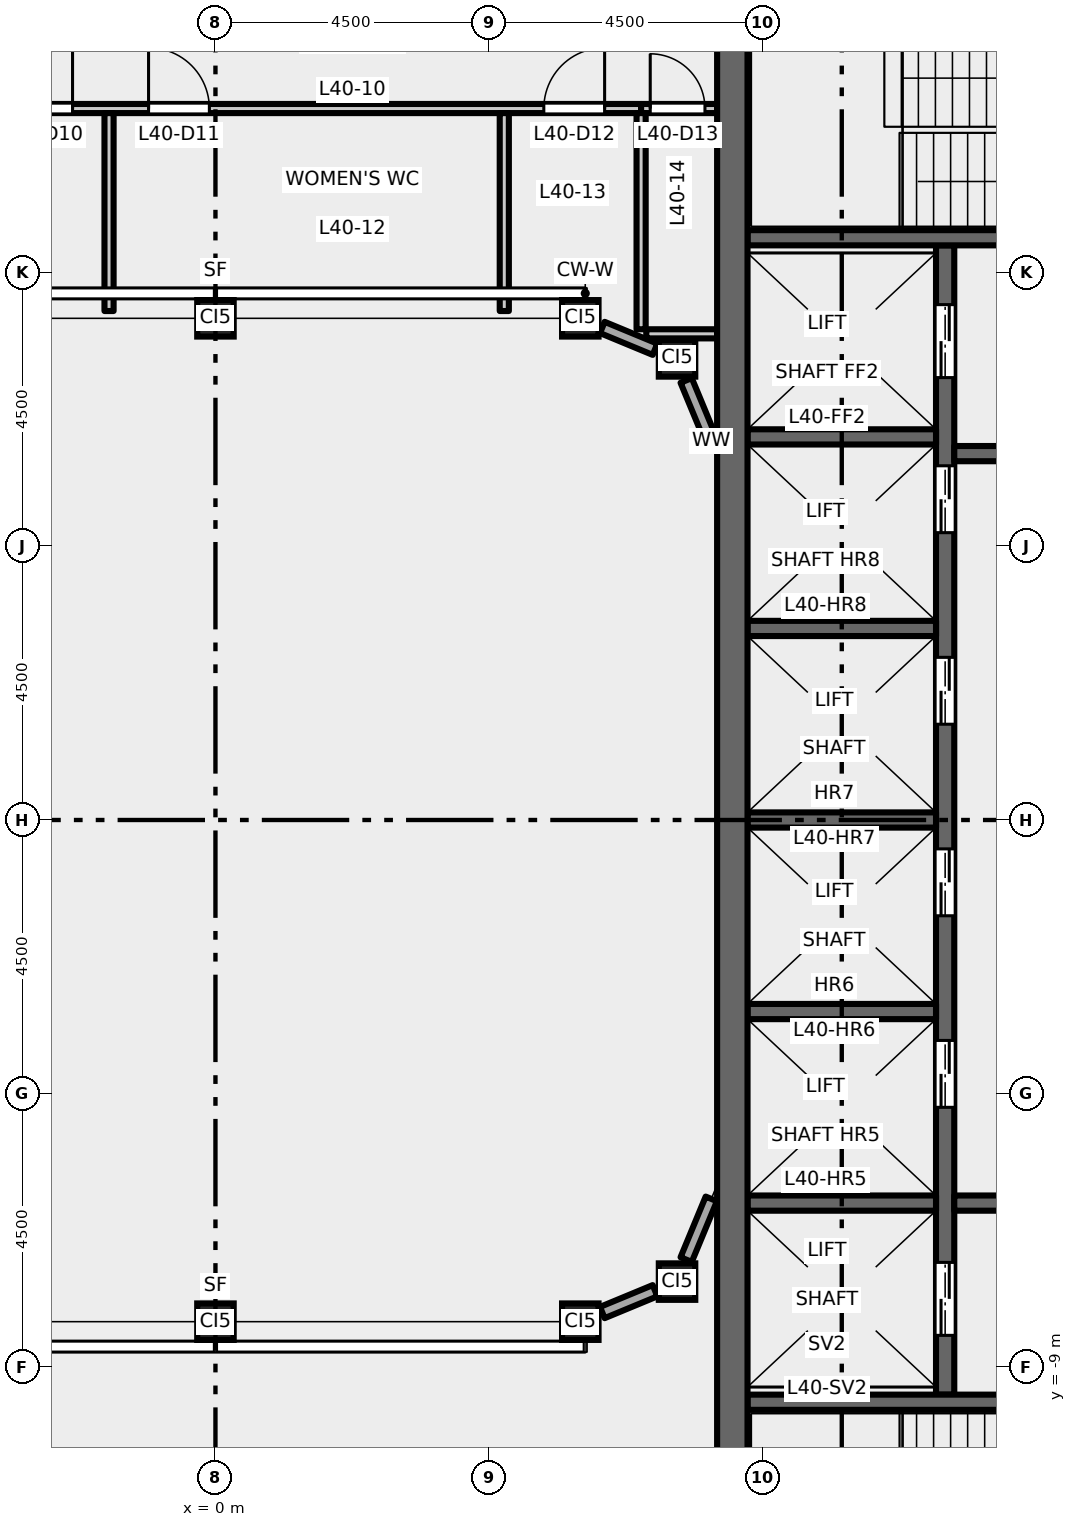
"""IFC4 building model, lengths in metres.
Left out: names, types, materials, properties, quantities, classifications, styles, units other than length and angle.
Written with IfcOpenShell. Run it as: python <this file> out.ifc"""

import sys

from ifc_helpers import new_model, si_unit, direction, frame, frame_2d, origin, origin_2d, place, context, subcontext, project, spatial, rectangle, hollow_rectangle, extrude, element, fill, save


model = new_model("IFC4")
c1 = context("Model", 3, precision=1e-05, world=origin(), true_north=direction((0.0, 1.0)))
c2 = subcontext(c1, "Body", "Model", "MODEL_VIEW")
j1 = project(units=[si_unit("LENGTHUNIT", "METRE"), si_unit("PLANEANGLEUNIT", "RADIAN")], contexts=[c1])
p1 = place(None, origin())
s1 = spatial("IfcSite", under=j1, at=p1, CompositionType="ELEMENT")
p2 = place(p1, origin())
s2 = spatial("IfcBuilding", under=s1, at=p2, CompositionType="ELEMENT")
p3 = place(p2, frame((0.0, 0.0, 187.2)))
s3 = spatial("IfcBuildingStorey", under=s2, at=p3, CompositionType="ELEMENT", Elevation=187.2)
for number, where, z_axis, x_axis in (
    (1, (0.0, -8.25, 0.0), (0.0, 0.0, 1.0), (1.0, 0.0, 0.0)),
    (2, (6.0, -8.25, 0.0), (0.0, 0.0, 1.0), (1.0, 0.0, 0.0)),
    (3, (7.591, -7.591, 0.0), (0.0, 0.0, 1.0), (1.0, 0.0, 0.0)),
    (4, (0.0, 8.25, 0.0), (0.0, 0.0, 1.0), (1.0, 0.0, 0.0)),
    (5, (6.0, 8.25, 0.0), (0.0, 0.0, 1.0), (1.0, 0.0, 0.0)),
    (6, (7.591, 7.591, 0.0), (0.0, 0.0, 1.0), (1.0, 0.0, 0.0)),
):
    element("IfcColumn", number, at=place(p3, frame(where, z_axis=z_axis, x_axis=x_axis)), inside=s3, PredefinedType="COLUMN", context=c2, shape_type="SweptSolid", body=[
        extrude(hollow_rectangle(XDim=0.6, YDim=0.6, WallThickness=0.032, at=origin_2d()), origin(), (0.0, 0.0, 1.0), 5.5),
    ])
p4 = place(p3, frame((12.0, -9.45, 0.0), z_axis=(0.0, 0.0, 1.0), x_axis=(0.0, 1.0, 0.0)))
e7 = element("IfcWall", 7, at=p4, inside=s3, PredefinedType="SHEAR", context=c2, shape_type="SweptSolid", body=[
    extrude(rectangle(XDim=18.9, YDim=0.3, at=frame_2d((9.45, 0.0))), origin(), (0.0, 0.0, 1.0), 5.35),
])
p5 = place(p4, frame((4.725, 0.0, 0.0)))
e8 = element("IfcOpeningElement", 8, at=p5, cuts=e7, PredefinedType="OPENING", context=c2, shape_type="SweptSolid", body=[
    extrude(rectangle(XDim=1.1, YDim=2.1, at=frame_2d((0.55, 1.05))), frame((0.0, 0.16, 0.0), z_axis=(0.0, -1.0, 0.0), x_axis=(1.0, 0.0, 0.0)), (0.0, 0.0, 1.0), 0.32),
])
p6 = place(p4, frame((7.875, 0.0, 0.0)))
e9 = element("IfcOpeningElement", 9, at=p6, cuts=e7, PredefinedType="OPENING", context=c2, shape_type="SweptSolid", body=[
    extrude(rectangle(XDim=1.1, YDim=2.1, at=frame_2d((0.55, 1.05))), frame((0.0, 0.16, 0.0), z_axis=(0.0, -1.0, 0.0), x_axis=(1.0, 0.0, 0.0)), (0.0, 0.0, 1.0), 0.32),
])
p7 = place(p4, frame((11.025, 0.0, 0.0)))
e10 = element("IfcOpeningElement", 10, at=p7, cuts=e7, PredefinedType="OPENING", context=c2, shape_type="SweptSolid", body=[
    extrude(rectangle(XDim=1.1, YDim=2.1, at=frame_2d((0.55, 1.05))), frame((0.0, 0.16, 0.0), z_axis=(0.0, -1.0, 0.0), x_axis=(1.0, 0.0, 0.0)), (0.0, 0.0, 1.0), 0.32),
])
p8 = place(p4, frame((14.175, 0.0, 0.0)))
e11 = element("IfcOpeningElement", 11, at=p8, cuts=e7, PredefinedType="OPENING", context=c2, shape_type="SweptSolid", body=[
    extrude(rectangle(XDim=1.1, YDim=2.1, at=frame_2d((0.55, 1.05))), frame((0.0, 0.16, 0.0), z_axis=(0.0, -1.0, 0.0), x_axis=(1.0, 0.0, 0.0)), (0.0, 0.0, 1.0), 0.32),
])
p9 = place(p4, frame((16.725, 0.0, 0.0)))
e12 = element("IfcOpeningElement", 12, at=p9, cuts=e7, PredefinedType="OPENING", context=c2, shape_type="SweptSolid", body=[
    extrude(rectangle(XDim=1.2, YDim=2.1, at=frame_2d((0.6, 1.05))), frame((0.0, 0.16, 0.0), z_axis=(0.0, -1.0, 0.0), x_axis=(1.0, 0.0, 0.0)), (0.0, 0.0, 1.0), 0.32),
])
p10 = place(p4, frame((0.975, 0.0, 0.0)))
e13 = element("IfcOpeningElement", 13, at=p10, cuts=e7, PredefinedType="OPENING", context=c2, shape_type="SweptSolid", body=[
    extrude(rectangle(XDim=1.2, YDim=2.1, at=frame_2d((0.6, 1.05))), frame((0.0, 0.16, 0.0), z_axis=(0.0, -1.0, 0.0), x_axis=(1.0, 0.0, 0.0)), (0.0, 0.0, 1.0), 0.32),
])
p11 = place(p3, frame((12.15, 6.025, 0.0), z_axis=(0.0, 0.0, 1.0), x_axis=(1.0, 0.0, 0.0)))
e14 = element("IfcWall", 14, at=p11, inside=s3, PredefinedType="SHEAR", context=c2, shape_type="SweptSolid", body=[
    extrude(rectangle(XDim=4.6, YDim=0.25, at=frame_2d((2.3, 0.0))), origin(), (0.0, 0.0, 1.0), 5.35),
])
p12 = place(p11, frame((1.8, 0.0, 0.0)))
e15 = element("IfcOpeningElement", 15, at=p12, cuts=e14, PredefinedType="OPENING", context=c2, shape_type="SweptSolid", body=[
    extrude(rectangle(XDim=1.0, YDim=2.1, at=frame_2d((0.5, 1.05))), frame((0.0, 0.135, 0.0), z_axis=(0.0, -1.0, 0.0), x_axis=(1.0, 0.0, 0.0)), (0.0, 0.0, 1.0), 0.27),
])
p13 = place(p3, frame((12.15, -6.3, 0.0), z_axis=(0.0, 0.0, 1.0), x_axis=(1.0, 0.0, 0.0)))
e16 = element("IfcWall", 16, at=p13, inside=s3, PredefinedType="SHEAR", context=c2, shape_type="SweptSolid", body=[
    extrude(rectangle(XDim=9.1, YDim=0.25, at=frame_2d((4.55, 0.0))), origin(), (0.0, 0.0, 1.0), 5.35),
])
p14 = place(p13, frame((1.8, 0.0, 0.0)))
e17 = element("IfcOpeningElement", 17, at=p14, cuts=e16, PredefinedType="OPENING", context=c2, shape_type="SweptSolid", body=[
    extrude(rectangle(XDim=1.0, YDim=2.1, at=frame_2d((0.5, 1.05))), frame((0.0, 0.135, 0.0), z_axis=(0.0, -1.0, 0.0), x_axis=(1.0, 0.0, 0.0)), (0.0, 0.0, 1.0), 0.27),
])
p15 = place(p13, frame((7.65, 0.0, 0.0)))
e18 = element("IfcOpeningElement", 18, at=p15, cuts=e16, PredefinedType="OPENING", context=c2, shape_type="SweptSolid", body=[
    extrude(rectangle(XDim=0.9, YDim=2.1, at=frame_2d((0.45, 1.05))), frame((0.0, 0.135, 0.0), z_axis=(0.0, -1.0, 0.0), x_axis=(1.0, 0.0, 0.0)), (0.0, 0.0, 1.0), 0.27),
])
for number, where, z_axis, x_axis in (
    (19, (8.75, 0.0, 0.0), (0.0, 0.0, 1.0), (1.0, 0.0, 0.0)),
    (20, (8.75, 3.15, 0.0), (0.0, 0.0, 1.0), (1.0, 0.0, 0.0)),
    (21, (8.75, 6.3, 0.0), (0.0, 0.0, 1.0), (1.0, 0.0, 0.0)),
    (22, (8.75, -3.15, 0.0), (0.0, 0.0, 1.0), (1.0, 0.0, 0.0)),
    (23, (8.75, -6.3, 0.0), (0.0, 0.0, 1.0), (1.0, 0.0, 0.0)),
):
    element("IfcWall", number, at=place(p3, frame(where, z_axis=z_axis, x_axis=x_axis)), inside=s3, PredefinedType="SHEAR", context=c2, shape_type="SweptSolid", body=[
        extrude(rectangle(XDim=3.1, YDim=0.25, at=frame_2d((1.55, 0.0))), origin(), (0.0, 0.0, 1.0), 5.35),
    ])
p16 = place(p3, frame((8.75, 9.575, 0.0), z_axis=(0.0, 0.0, 1.0), x_axis=(1.0, 0.0, 0.0)))
e24 = element("IfcWall", 24, at=p16, inside=s3, PredefinedType="SHEAR", context=c2, shape_type="SweptSolid", body=[
    extrude(rectangle(XDim=8.0, YDim=0.25, at=frame_2d((4.0, 0.0))), origin(), (0.0, 0.0, 1.0), 5.35),
])
p17 = place(p16, frame((6.65, 0.0, 0.0)))
e25 = element("IfcOpeningElement", 25, at=p17, cuts=e24, PredefinedType="OPENING", context=c2, shape_type="SweptSolid", body=[
    extrude(rectangle(XDim=1.1, YDim=2.1, at=frame_2d((0.55, 1.05))), frame((0.0, 0.135, 0.0), z_axis=(0.0, -1.0, 0.0), x_axis=(1.0, 0.0, 0.0)), (0.0, 0.0, 1.0), 0.27),
])
p18 = place(p3, frame((8.75, -9.575, 0.0), z_axis=(0.0, 0.0, 1.0), x_axis=(1.0, 0.0, 0.0)))
e26 = element("IfcWall", 26, at=p18, inside=s3, PredefinedType="SHEAR", context=c2, shape_type="SweptSolid", body=[
    extrude(rectangle(XDim=8.0, YDim=0.25, at=frame_2d((4.0, 0.0))), origin(), (0.0, 0.0, 1.0), 5.35),
])
p19 = place(p18, frame((6.65, 0.0, 0.0)))
e27 = element("IfcOpeningElement", 27, at=p19, cuts=e26, PredefinedType="OPENING", context=c2, shape_type="SweptSolid", body=[
    extrude(rectangle(XDim=1.1, YDim=2.1, at=frame_2d((0.55, 1.05))), frame((0.0, 0.135, 0.0), z_axis=(0.0, -1.0, 0.0), x_axis=(1.0, 0.0, 0.0)), (0.0, 0.0, 1.0), 0.27),
])
p20 = place(p3, frame((8.5, -13.0, 0.0), z_axis=(0.0, 0.0, 1.0), x_axis=(0.0, 1.0, 0.0)))
e28 = element("IfcWall", 28, at=p20, inside=s3, PredefinedType="SHEAR", context=c2, shape_type="SweptSolid", body=[
    extrude(rectangle(XDim=26.0, YDim=0.5, at=frame_2d((13.0, 0.0))), origin(), (0.0, 0.0, 1.0), 5.35),
])
p21 = place(p3, frame((6.362, -8.1, 0.0), z_axis=(0.0, 0.0, 1.0), x_axis=(0.923829670615, 0.382803787458, 0.0)))
e29 = element("IfcWall", 29, at=p21, inside=s3, PredefinedType="STANDARD", context=c2, shape_type="SweptSolid", body=[
    extrude(rectangle(XDim=0.938, YDim=0.2, at=frame_2d((0.469, 0.0))), origin(), (0.0, 0.0, 1.0), 4.918),
])
for number, where, z_axis, x_axis in (
    (30, (7.741, -7.229, 0.0), (0.0, 0.0, 1.0), (0.383, 0.924, 0.0)),
    (31, (8.154, 6.231, 0.0), (0.0, 0.0, 1.0), (-0.383, 0.924, 0.0)),
):
    element("IfcWall", number, at=place(p3, frame(where, z_axis=z_axis, x_axis=x_axis)), inside=s3, PredefinedType="STANDARD", context=c2, shape_type="SweptSolid", body=[
        extrude(rectangle(XDim=1.08, YDim=0.2, at=frame_2d((0.54, 0.0))), origin(), (0.0, 0.0, 1.0), 4.918),
    ])
p22 = place(p3, frame((7.229, 7.741, 0.0), z_axis=(0.0, 0.0, 1.0), x_axis=(-0.923829670615, 0.382803787458, 0.0)))
e32 = element("IfcWall", 32, at=p22, inside=s3, PredefinedType="STANDARD", context=c2, shape_type="SweptSolid", body=[
    extrude(rectangle(XDim=0.938, YDim=0.2, at=frame_2d((0.469, 0.0))), origin(), (0.0, 0.0, 1.0), 4.918),
])
p23 = place(p3, frame((7.085, 7.995, 0.0), z_axis=(0.0, 0.0, 1.0), x_axis=(1.0, 0.0, 0.0)))
e33 = element("IfcWall", 33, at=p23, inside=s3, PredefinedType="PARTITIONING", context=c2, shape_type="SweptSolid", body=[
    extrude(rectangle(XDim=1.165, YDim=0.15, at=frame_2d((0.583, 0.0))), origin(), (0.0, 0.0, 1.0), 5.35),
])
p24 = place(p3, frame((-8.25, 11.7, 0.0), z_axis=(0.0, 0.0, 1.0), x_axis=(1.0, 0.0, 0.0)))
e34 = element("IfcWall", 34, at=p24, inside=s3, PredefinedType="PARTITIONING", context=c2, shape_type="SweptSolid", body=[
    extrude(rectangle(XDim=15.25, YDim=0.15, at=frame_2d((7.625, 0.0))), origin(), (0.0, 0.0, 1.0), 5.35),
])
p25 = place(p24, frame((4.9, 0.0, 0.0)))
e35 = element("IfcOpeningElement", 35, at=p25, cuts=e34, PredefinedType="OPENING", context=c2, shape_type="SweptSolid", body=[
    extrude(rectangle(XDim=1.0, YDim=2.1, at=frame_2d((0.5, 1.05))), frame((0.0, 0.085, 0.0), z_axis=(0.0, -1.0, 0.0), x_axis=(1.0, 0.0, 0.0)), (0.0, 0.0, 1.0), 0.17),
])
p26 = place(p24, frame((7.15, 0.0, 0.0)))
e36 = element("IfcOpeningElement", 36, at=p26, cuts=e34, PredefinedType="OPENING", context=c2, shape_type="SweptSolid", body=[
    extrude(rectangle(XDim=1.0, YDim=2.1, at=frame_2d((0.5, 1.05))), frame((0.0, 0.085, 0.0), z_axis=(0.0, -1.0, 0.0), x_axis=(1.0, 0.0, 0.0)), (0.0, 0.0, 1.0), 0.17),
])
p27 = place(p24, frame((13.65, 0.0, 0.0)))
e37 = element("IfcOpeningElement", 37, at=p27, cuts=e34, PredefinedType="OPENING", context=c2, shape_type="SweptSolid", body=[
    extrude(rectangle(XDim=1.0, YDim=2.1, at=frame_2d((0.5, 1.05))), frame((0.0, 0.085, 0.0), z_axis=(0.0, -1.0, 0.0), x_axis=(1.0, 0.0, 0.0)), (0.0, 0.0, 1.0), 0.17),
])
p28 = place(p3, frame((7.0, 11.7, 0.0), z_axis=(0.0, 0.0, 1.0), x_axis=(1.0, 0.0, 0.0)))
e38 = element("IfcWall", 38, at=p28, inside=s3, PredefinedType="PARTITIONING", context=c2, shape_type="SweptSolid", body=[
    extrude(rectangle(XDim=1.25, YDim=0.15, at=frame_2d((0.625, 0.0))), origin(), (0.0, 0.0, 1.0), 5.35),
])
p29 = place(p28, frame((0.15, 0.0, 0.0)))
e39 = element("IfcOpeningElement", 39, at=p29, cuts=e38, PredefinedType="OPENING", context=c2, shape_type="SweptSolid", body=[
    extrude(rectangle(XDim=0.9, YDim=2.1, at=frame_2d((0.45, 1.05))), frame((0.0, 0.085, 0.0), z_axis=(0.0, -1.0, 0.0), x_axis=(1.0, 0.0, 0.0)), (0.0, 0.0, 1.0), 0.17),
])
for number, where, z_axis, x_axis in (
    (40, (-1.75, 8.37, 0.0), (0.0, 0.0, 1.0), (0.0, 1.0, 0.0)),
    (41, (4.75, 8.37, 0.0), (0.0, 0.0, 1.0), (0.0, 1.0, 0.0)),
):
    element("IfcWall", number, at=place(p3, frame(where, z_axis=z_axis, x_axis=x_axis)), inside=s3, PredefinedType="PARTITIONING", context=c2, shape_type="SweptSolid", body=[
        extrude(rectangle(XDim=3.255, YDim=0.15, at=frame_2d((1.627, 0.0))), origin(), (0.0, 0.0, 1.0), 5.35),
    ])
p30 = place(p3, frame((7.0, 8.07, 0.0), z_axis=(0.0, 0.0, 1.0), x_axis=(0.0, 1.0, 0.0)))
e42 = element("IfcWall", 42, at=p30, inside=s3, PredefinedType="PARTITIONING", context=c2, shape_type="SweptSolid", body=[
    extrude(rectangle(XDim=3.555, YDim=0.15, at=frame_2d((1.777, 0.0))), origin(), (0.0, 0.0, 1.0), 5.35),
])
p31 = place(p5, origin())
e43 = element("IfcDoor", 43, at=p31, inside=s3, OperationType="DOUBLE_DOOR_SLIDING", PredefinedType="DOOR", context=c2, shape_type="SweptSolid", body=[
    extrude(rectangle(XDim=1.1, YDim=2.1, at=frame_2d((0.55, 1.05))), frame((0.0, 0.025, 0.0), z_axis=(0.0, -1.0, 0.0), x_axis=(1.0, 0.0, 0.0)), (0.0, 0.0, 1.0), 0.05),
])
fill(e8, e43)
p32 = place(p6, origin())
e44 = element("IfcDoor", 44, at=p32, inside=s3, OperationType="DOUBLE_DOOR_SLIDING", PredefinedType="DOOR", context=c2, shape_type="SweptSolid", body=[
    extrude(rectangle(XDim=1.1, YDim=2.1, at=frame_2d((0.55, 1.05))), frame((0.0, 0.025, 0.0), z_axis=(0.0, -1.0, 0.0), x_axis=(1.0, 0.0, 0.0)), (0.0, 0.0, 1.0), 0.05),
])
fill(e9, e44)
p33 = place(p7, origin())
e45 = element("IfcDoor", 45, at=p33, inside=s3, OperationType="DOUBLE_DOOR_SLIDING", PredefinedType="DOOR", context=c2, shape_type="SweptSolid", body=[
    extrude(rectangle(XDim=1.1, YDim=2.1, at=frame_2d((0.55, 1.05))), frame((0.0, 0.025, 0.0), z_axis=(0.0, -1.0, 0.0), x_axis=(1.0, 0.0, 0.0)), (0.0, 0.0, 1.0), 0.05),
])
fill(e10, e45)
p34 = place(p8, origin())
e46 = element("IfcDoor", 46, at=p34, inside=s3, OperationType="DOUBLE_DOOR_SLIDING", PredefinedType="DOOR", context=c2, shape_type="SweptSolid", body=[
    extrude(rectangle(XDim=1.1, YDim=2.1, at=frame_2d((0.55, 1.05))), frame((0.0, 0.025, 0.0), z_axis=(0.0, -1.0, 0.0), x_axis=(1.0, 0.0, 0.0)), (0.0, 0.0, 1.0), 0.05),
])
fill(e11, e46)
p35 = place(p9, origin())
e47 = element("IfcDoor", 47, at=p35, inside=s3, OperationType="DOUBLE_DOOR_SLIDING", PredefinedType="DOOR", context=c2, shape_type="SweptSolid", body=[
    extrude(rectangle(XDim=1.2, YDim=2.1, at=frame_2d((0.6, 1.05))), frame((0.0, 0.025, 0.0), z_axis=(0.0, -1.0, 0.0), x_axis=(1.0, 0.0, 0.0)), (0.0, 0.0, 1.0), 0.05),
])
fill(e12, e47)
p36 = place(p10, origin())
e48 = element("IfcDoor", 48, at=p36, inside=s3, OperationType="DOUBLE_DOOR_SLIDING", PredefinedType="DOOR", context=c2, shape_type="SweptSolid", body=[
    extrude(rectangle(XDim=1.2, YDim=2.1, at=frame_2d((0.6, 1.05))), frame((0.0, 0.025, 0.0), z_axis=(0.0, -1.0, 0.0), x_axis=(1.0, 0.0, 0.0)), (0.0, 0.0, 1.0), 0.05),
])
fill(e13, e48)
p37 = place(p25, origin())
e49 = element("IfcDoor", 49, at=p37, inside=s3, OperationType="SINGLE_SWING_RIGHT", PredefinedType="DOOR", context=c2, shape_type="SweptSolid", body=[
    extrude(rectangle(XDim=1.0, YDim=2.1, at=frame_2d((0.5, 1.05))), frame((0.0, 0.025, 0.0), z_axis=(0.0, -1.0, 0.0), x_axis=(1.0, 0.0, 0.0)), (0.0, 0.0, 1.0), 0.05),
])
fill(e35, e49)
p38 = place(p26, origin())
e50 = element("IfcDoor", 50, at=p38, inside=s3, OperationType="SINGLE_SWING_LEFT", PredefinedType="DOOR", context=c2, shape_type="SweptSolid", body=[
    extrude(rectangle(XDim=1.0, YDim=2.1, at=frame_2d((0.5, 1.05))), frame((0.0, 0.025, 0.0), z_axis=(0.0, -1.0, 0.0), x_axis=(1.0, 0.0, 0.0)), (0.0, 0.0, 1.0), 0.05),
])
fill(e36, e50)
p39 = place(p27, origin())
e51 = element("IfcDoor", 51, at=p39, inside=s3, OperationType="SINGLE_SWING_RIGHT", PredefinedType="DOOR", context=c2, shape_type="SweptSolid", body=[
    extrude(rectangle(XDim=1.0, YDim=2.1, at=frame_2d((0.5, 1.05))), frame((0.0, 0.025, 0.0), z_axis=(0.0, -1.0, 0.0), x_axis=(1.0, 0.0, 0.0)), (0.0, 0.0, 1.0), 0.05),
])
fill(e37, e51)
p40 = place(p29, origin())
e52 = element("IfcDoor", 52, at=p40, inside=s3, OperationType="SINGLE_SWING_LEFT", PredefinedType="DOOR", context=c2, shape_type="SweptSolid", body=[
    extrude(rectangle(XDim=0.9, YDim=2.1, at=frame_2d((0.45, 1.05))), frame((0.0, 0.025, 0.0), z_axis=(0.0, -1.0, 0.0), x_axis=(1.0, 0.0, 0.0)), (0.0, 0.0, 1.0), 0.05),
])
fill(e39, e52)
save(model, sys.argv[1])
